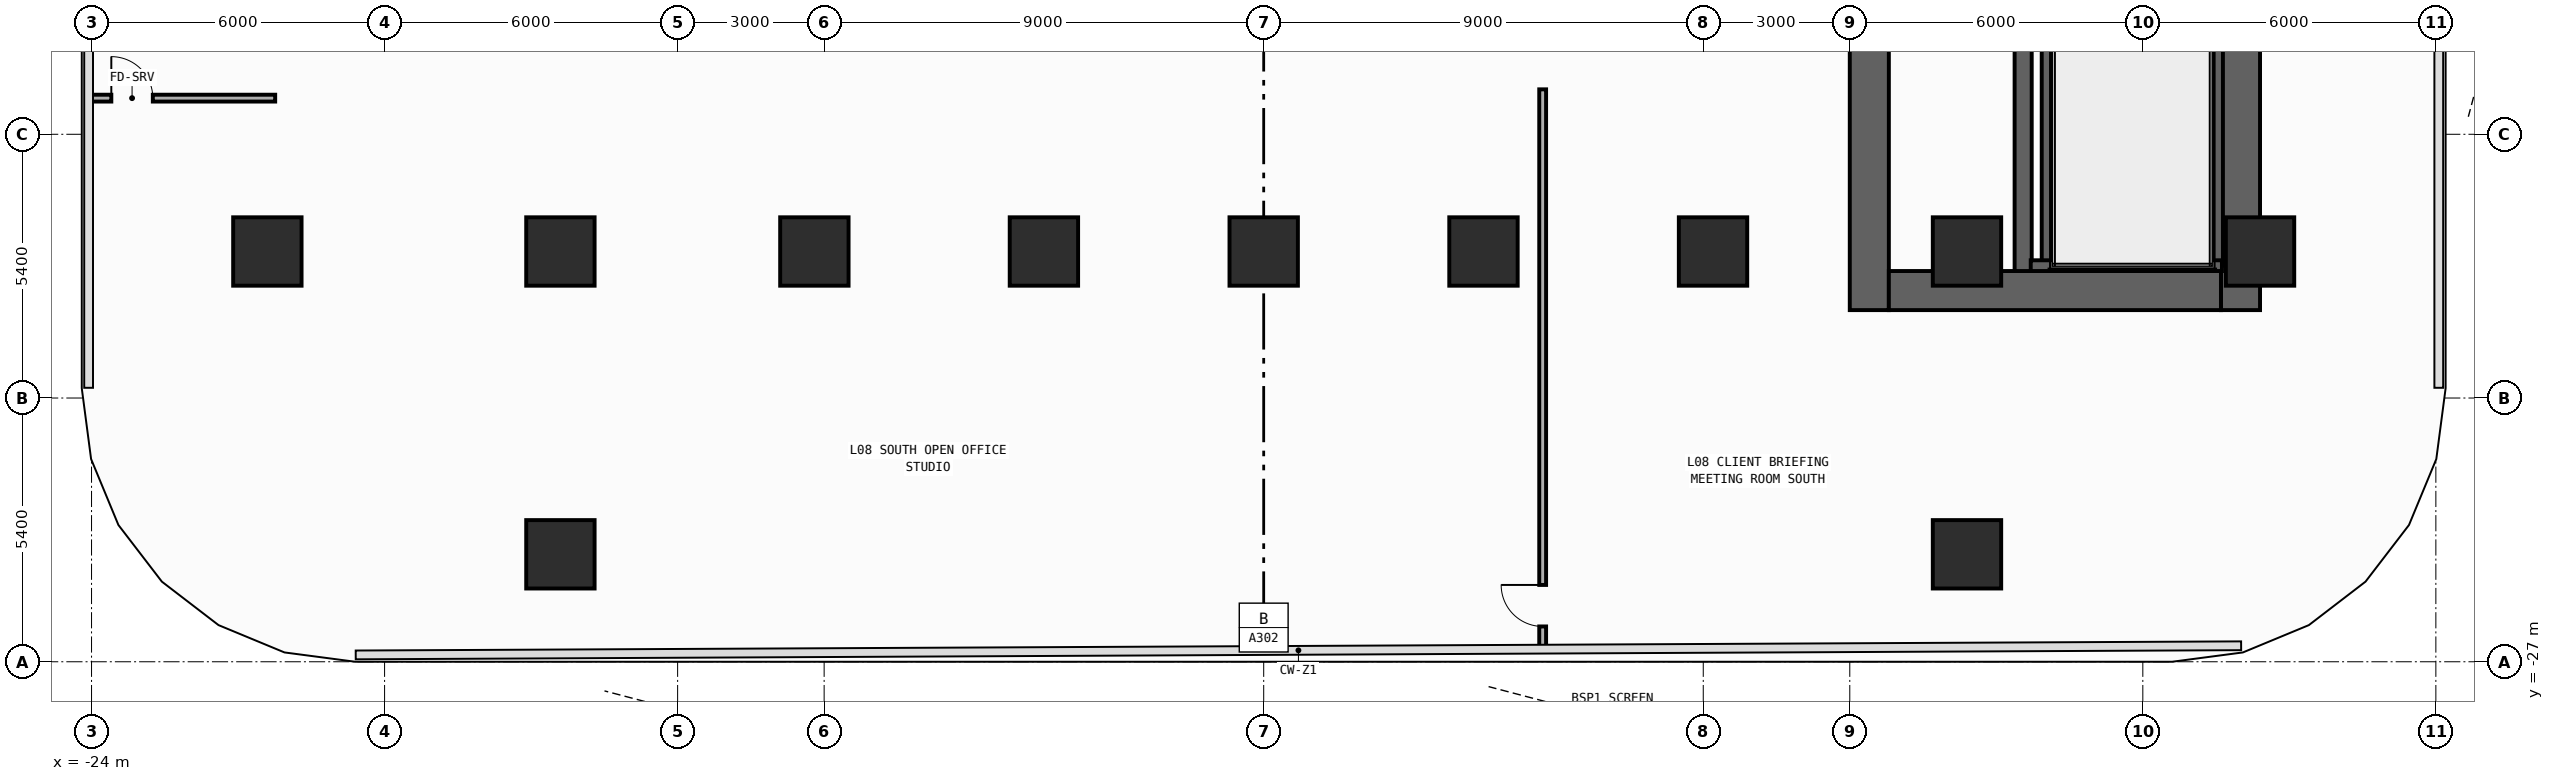
"""IFC4 building model, lengths in metres.
Left out: names, types, materials, properties, quantities, classifications, styles, units other than length and angle.
Written with IfcOpenShell. Run it as: python <this file> out.ifc"""

import sys

from ifc_helpers import new_model, si_unit, direction, frame, frame_2d, origin, origin_2d, place, context, subcontext, project, spatial, rectangle, extrude, element, fill, save


model = new_model("IFC4")
c1 = context("Model", 3, precision=1e-05, world=origin(), true_north=direction((0.0, 1.0)))
c2 = subcontext(c1, "Body", "Model", "MODEL_VIEW")
j1 = project(units=[si_unit("LENGTHUNIT", "METRE"), si_unit("PLANEANGLEUNIT", "RADIAN")], contexts=[c1])
p1 = place(None, origin())
s1 = spatial("IfcSite", under=j1, at=p1, CompositionType="ELEMENT")
p2 = place(p1, origin())
s2 = spatial("IfcBuilding", under=s1, at=p2, CompositionType="ELEMENT")
p3 = place(p2, frame((0.0, 0.0, 34.4)))
s3 = spatial("IfcBuildingStorey", under=s2, at=p3, CompositionType="ELEMENT", Elevation=34.4)
p4 = place(p3, frame((12.4, -19.8, 0.0), z_axis=(0.0, 0.0, 1.0), x_axis=(0.0, 1.0, 0.0)))
e1 = element("IfcWall", 1, at=p4, inside=s3, PredefinedType="SHEAR", context=c2, shape_type="SweptSolid", body=[
    extrude(rectangle(XDim=27.0, YDim=0.8, at=frame_2d((13.5, 0.0))), origin(), (0.0, 0.0, 1.0), 3.94),
])
p5 = place(p4, frame((23.05, 0.0, 0.0)))
e2 = element("IfcOpeningElement", 2, at=p5, cuts=e1, PredefinedType="OPENING", context=c2, shape_type="SweptSolid", body=[
    extrude(rectangle(XDim=1.1, YDim=2.2, at=frame_2d((0.55, 1.1))), frame((0.0, 0.41, 0.0), z_axis=(0.0, -1.0, 0.0), x_axis=(1.0, 0.0, 0.0)), (0.0, 0.0, 1.0), 0.82),
])
p6 = place(p4, frame((19.85, 0.0, 0.0)))
e3 = element("IfcOpeningElement", 3, at=p6, cuts=e1, PredefinedType="OPENING", context=c2, shape_type="SweptSolid", body=[
    extrude(rectangle(XDim=1.1, YDim=2.2, at=frame_2d((0.55, 1.1))), frame((0.0, 0.41, 0.0), z_axis=(0.0, -1.0, 0.0), x_axis=(1.0, 0.0, 0.0)), (0.0, 0.0, 1.0), 0.82),
])
p7 = place(p4, frame((16.65, 0.0, 0.0)))
e4 = element("IfcOpeningElement", 4, at=p7, cuts=e1, PredefinedType="OPENING", context=c2, shape_type="SweptSolid", body=[
    extrude(rectangle(XDim=1.1, YDim=2.2, at=frame_2d((0.55, 1.1))), frame((0.0, 0.41, 0.0), z_axis=(0.0, -1.0, 0.0), x_axis=(1.0, 0.0, 0.0)), (0.0, 0.0, 1.0), 0.82),
])
p8 = place(p4, frame((7.175, 0.0, 0.0)))
e5 = element("IfcOpeningElement", 5, at=p8, cuts=e1, PredefinedType="OPENING", context=c2, shape_type="SweptSolid", body=[
    extrude(rectangle(XDim=0.85, YDim=2.1, at=frame_2d((0.425, 1.05))), frame((0.0, 0.41, 0.0), z_axis=(0.0, -1.0, 0.0), x_axis=(1.0, 0.0, 0.0)), (0.0, 0.0, 1.0), 0.82),
])
p9 = place(p4, frame((10.375, 0.0, 0.0)))
e6 = element("IfcOpeningElement", 6, at=p9, cuts=e1, PredefinedType="OPENING", context=c2, shape_type="SweptSolid", body=[
    extrude(rectangle(XDim=0.85, YDim=2.1, at=frame_2d((0.425, 1.05))), frame((0.0, 0.41, 0.0), z_axis=(0.0, -1.0, 0.0), x_axis=(1.0, 0.0, 0.0)), (0.0, 0.0, 1.0), 0.82),
])
p10 = place(p4, frame((12.725, 0.0, 0.0)))
e7 = element("IfcOpeningElement", 7, at=p10, cuts=e1, PredefinedType="OPENING", context=c2, shape_type="SweptSolid", body=[
    extrude(rectangle(XDim=1.15, YDim=2.2, at=frame_2d((0.575, 1.1))), frame((0.0, 0.41, 0.0), z_axis=(0.0, -1.0, 0.0), x_axis=(1.0, 0.0, 0.0)), (0.0, 0.0, 1.0), 0.82),
])
p11 = place(p4, frame((25.125, 0.0, 0.0)))
e8 = element("IfcOpeningElement", 8, at=p11, cuts=e1, PredefinedType="OPENING", context=c2, shape_type="SweptSolid", body=[
    extrude(rectangle(XDim=0.85, YDim=2.1, at=frame_2d((0.425, 1.05))), frame((0.0, 0.41, 0.0), z_axis=(0.0, -1.0, 0.0), x_axis=(1.0, 0.0, 0.0)), (0.0, 0.0, 1.0), 0.82),
])
p12 = place(p3, frame((20.0, -19.8, 0.0), z_axis=(0.0, 0.0, 1.0), x_axis=(0.0, 1.0, 0.0)))
e9 = element("IfcWall", 9, at=p12, inside=s3, PredefinedType="SHEAR", context=c2, shape_type="SweptSolid", body=[
    extrude(rectangle(XDim=27.0, YDim=0.8, at=frame_2d((13.5, 0.0))), origin(), (0.0, 0.0, 1.0), 3.94),
])
p13 = place(p3, frame((12.8, -19.4, 0.0), z_axis=(0.0, 0.0, 1.0), x_axis=(1.0, 0.0, 0.0)))
e10 = element("IfcWall", 10, at=p13, inside=s3, PredefinedType="SHEAR", context=c2, shape_type="SweptSolid", body=[
    extrude(rectangle(XDim=6.8, YDim=0.8, at=frame_2d((3.4, 0.0))), origin(), (0.0, 0.0, 1.0), 3.94),
])
p14 = place(p3, frame((15.55, -19.0, 0.0), z_axis=(0.0, 0.0, 1.0), x_axis=(0.0, 1.0, 0.0)))
e11 = element("IfcWall", 11, at=p14, inside=s3, PredefinedType="SHEAR", context=c2, shape_type="SweptSolid", body=[
    extrude(rectangle(XDim=25.4, YDim=0.35, at=frame_2d((12.7, 0.0))), origin(), (0.0, 0.0, 1.0), 3.94),
])
p15 = place(p14, frame((11.925, 0.0, 0.0)))
e12 = element("IfcOpeningElement", 12, at=p15, cuts=e11, PredefinedType="OPENING", context=c2, shape_type="SweptSolid", body=[
    extrude(rectangle(XDim=1.15, YDim=2.2, at=frame_2d((0.575, 1.1))), frame((0.0, 0.185, 0.0), z_axis=(0.0, -1.0, 0.0), x_axis=(1.0, 0.0, 0.0)), (0.0, 0.0, 1.0), 0.37),
])
p16 = place(p14, frame((24.325, 0.0, 0.0)))
e13 = element("IfcOpeningElement", 13, at=p16, cuts=e11, PredefinedType="OPENING", context=c2, shape_type="SweptSolid", body=[
    extrude(rectangle(XDim=0.85, YDim=2.1, at=frame_2d((0.425, 1.05))), frame((0.0, 0.185, 0.0), z_axis=(0.0, -1.0, 0.0), x_axis=(1.0, 0.0, 0.0)), (0.0, 0.0, 1.0), 0.37),
])
for number, where, z_axis, x_axis in (
    (14, (16.04, -18.89, 0.0), (0.0, 0.0, 1.0), (0.0, 1.0, 0.0)),
    (15, (19.53, -18.89, 0.0), (0.0, 0.0, 1.0), (0.0, 1.0, 0.0)),
):
    element("IfcWall", number, at=place(p3, frame(where, z_axis=z_axis, x_axis=x_axis)), inside=s3, PredefinedType="SHEAR", context=c2, shape_type="SweptSolid", body=[
        extrude(rectangle(XDim=11.3, YDim=0.22, at=frame_2d((5.65, 0.0))), origin(), (0.0, 0.0, 1.0), 3.94),
    ])
p17 = place(p3, frame((15.705, -18.89, 0.0), z_axis=(0.0, 0.0, 1.0), x_axis=(1.0, 0.0, 0.0)))
e16 = element("IfcWall", 16, at=p17, inside=s3, PredefinedType="SHEAR", context=c2, shape_type="SweptSolid", body=[
    extrude(rectangle(XDim=3.915, YDim=0.22, at=frame_2d((1.958, 0.0))), origin(), (0.0, 0.0, 1.0), 3.94),
])
for number, where, z_axis, x_axis in (
    (17, (-9.2, -18.6, 0.0), (0.0, 0.0, 1.0), (1.0, 0.0, 0.0)),
    (18, (9.2, -18.6, 0.0), (0.0, 0.0, 1.0), (1.0, 0.0, 0.0)),
    (19, (-20.4, -18.6, 0.0), (0.0, 0.0, 1.0), (1.0, 0.0, 0.0)),
    (20, (20.4, -18.6, 0.0), (0.0, 0.0, 1.0), (1.0, 0.0, 0.0)),
    (21, (-14.4, -18.6, 0.0), (0.0, 0.0, 1.0), (1.0, 0.0, 0.0)),
    (22, (14.4, -18.6, 0.0), (0.0, 0.0, 1.0), (1.0, 0.0, 0.0)),
    (23, (-4.5, -18.6, 0.0), (0.0, 0.0, 1.0), (1.0, 0.0, 0.0)),
    (24, (0.0, -18.6, 0.0), (0.0, 0.0, 1.0), (1.0, 0.0, 0.0)),
    (25, (4.5, -18.6, 0.0), (0.0, 0.0, 1.0), (1.0, 0.0, 0.0)),
    (26, (-14.4, -24.8, 0.0), (0.0, 0.0, 1.0), (1.0, 0.0, 0.0)),
    (27, (14.4, -24.8, 0.0), (0.0, 0.0, 1.0), (1.0, 0.0, 0.0)),
):
    element("IfcColumn", number, at=place(p3, frame(where, z_axis=z_axis, x_axis=x_axis)), inside=s3, PredefinedType="COLUMN", context=c2, shape_type="SweptSolid", body=[
        extrude(rectangle(XDim=1.4, YDim=1.4, at=origin_2d()), origin(), (0.0, 0.0, 1.0), 4.2),
    ])
p18 = place(p3, frame((-24.055, -15.46, 0.0), z_axis=(0.0, 0.0, 1.0), x_axis=(1.0, 0.0, 0.0)))
e28 = element("IfcWall", 28, at=p18, inside=s3, PredefinedType="PARTITIONING", context=c2, shape_type="SweptSolid", body=[
    extrude(rectangle(XDim=3.815, YDim=0.14, at=frame_2d((1.907, 0.0))), origin(), (0.0, 0.0, 1.0), 3.94),
])
p19 = place(p18, frame((0.46, 0.0, 0.0)))
e29 = element("IfcOpeningElement", 29, at=p19, cuts=e28, PredefinedType="OPENING", context=c2, shape_type="SweptSolid", body=[
    extrude(rectangle(XDim=0.85, YDim=2.1, at=frame_2d((0.425, 1.05))), frame((0.0, 0.08, 0.0), z_axis=(0.0, -1.0, 0.0), x_axis=(1.0, 0.0, 0.0)), (0.0, 0.0, 1.0), 0.16),
])
p20 = place(p3, frame((5.712, -26.737, 0.0), z_axis=(0.0, 0.0, 1.0), x_axis=(0.0, 1.0, 0.0)))
e30 = element("IfcWall", 30, at=p20, inside=s3, PredefinedType="PARTITIONING", context=c2, shape_type="SweptSolid", body=[
    extrude(rectangle(XDim=11.457, YDim=0.14, at=frame_2d((5.729, 0.0))), origin(), (0.0, 0.0, 1.0), 3.94),
])
p21 = place(p20, frame((0.46, 0.0, 0.0)))
e31 = element("IfcOpeningElement", 31, at=p21, cuts=e30, PredefinedType="OPENING", context=c2, shape_type="SweptSolid", body=[
    extrude(rectangle(XDim=0.85, YDim=2.1, at=frame_2d((0.425, 1.05))), frame((0.0, 0.08, 0.0), z_axis=(0.0, -1.0, 0.0), x_axis=(1.0, 0.0, 0.0)), (0.0, 0.0, 1.0), 0.16),
])
p22 = place(p19, origin())
e32 = element("IfcDoor", 32, at=p22, inside=s3, OperationType="SINGLE_SWING_LEFT", PredefinedType="DOOR", context=c2, shape_type="SweptSolid", body=[
    extrude(rectangle(XDim=0.85, YDim=2.1, at=frame_2d((0.425, 1.05))), frame((0.0, 0.025, 0.0), z_axis=(0.0, -1.0, 0.0), x_axis=(1.0, 0.0, 0.0)), (0.0, 0.0, 1.0), 0.05),
])
fill(e29, e32)
p23 = place(p21, origin())
e33 = element("IfcDoor", 33, at=p23, inside=s3, OperationType="SINGLE_SWING_RIGHT", PredefinedType="DOOR", context=c2, shape_type="SweptSolid", body=[
    extrude(rectangle(XDim=0.85, YDim=2.1, at=frame_2d((0.425, 1.05))), frame((0.0, 0.025, 0.0), z_axis=(0.0, -1.0, 0.0), x_axis=(1.0, 0.0, 0.0)), (0.0, 0.0, 1.0), 0.05),
])
fill(e31, e33)
save(model, sys.argv[1])
